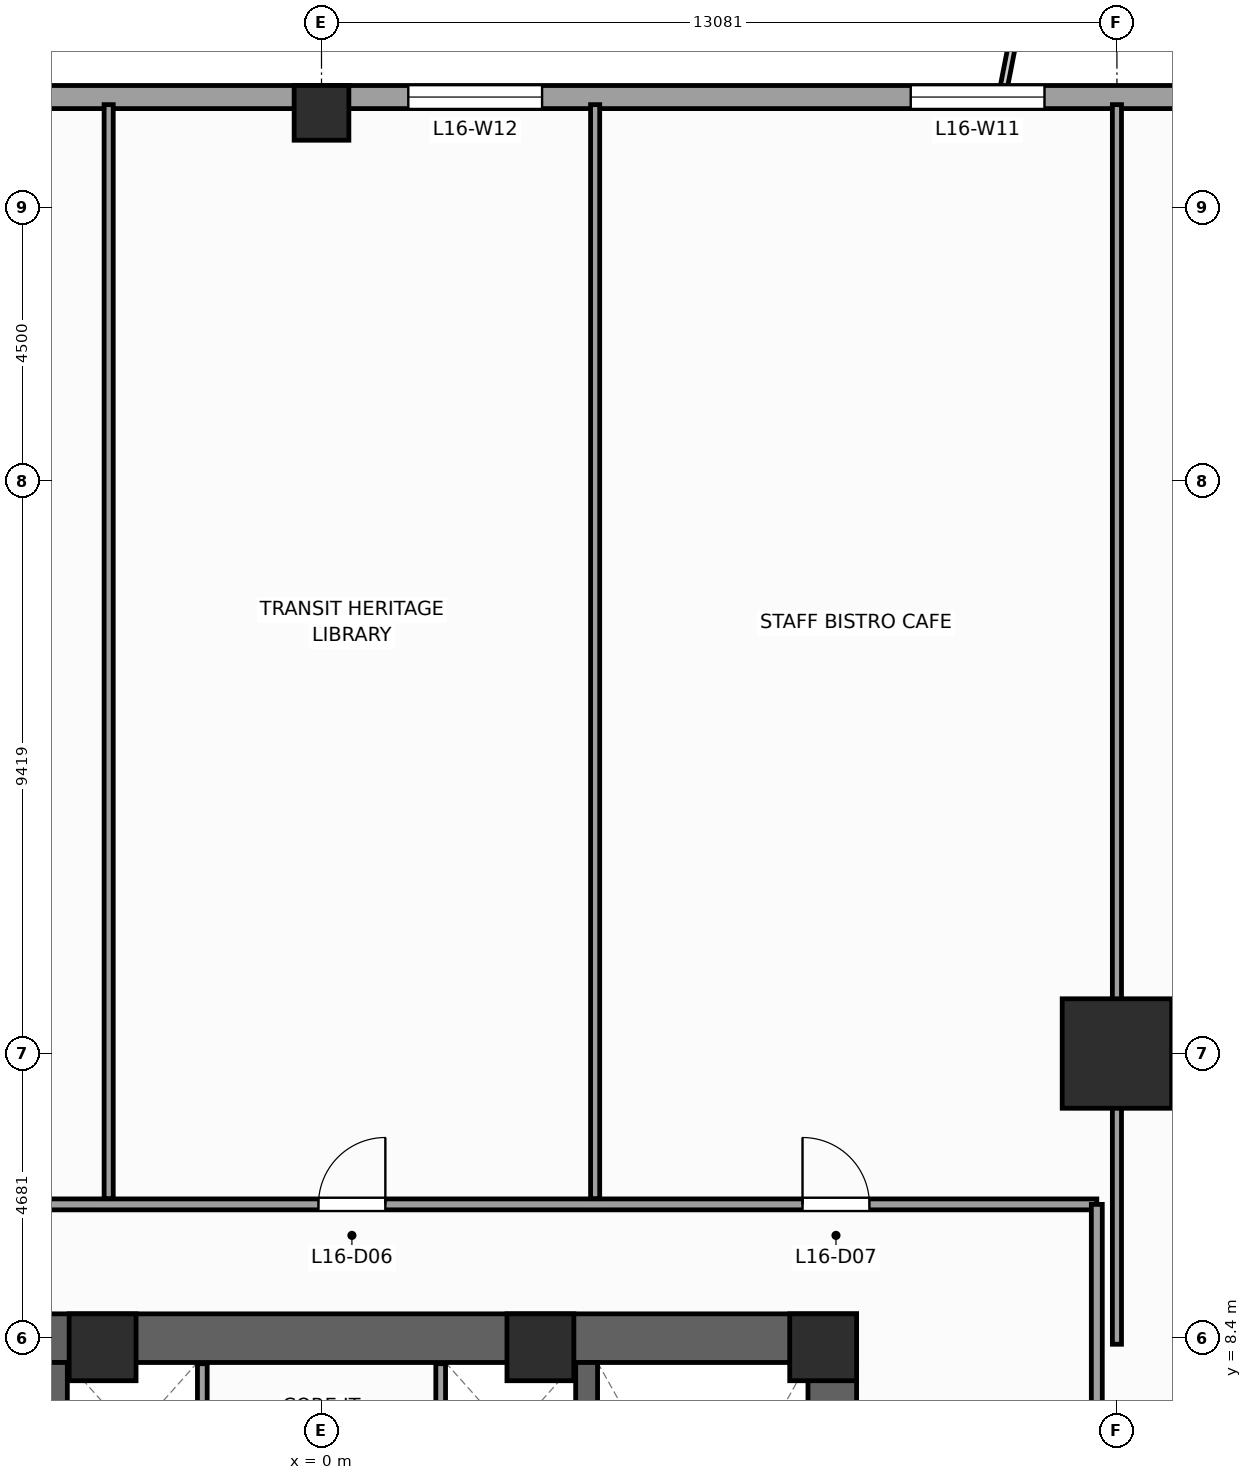
"""IFC4 building model, lengths in metres.
Left out: names, types, materials, properties, quantities, classifications, styles, units other than length and angle.
Written with IfcOpenShell. Run it as: python <this file> out.ifc"""

import sys

from ifc_helpers import new_model, si_unit, direction, frame, frame_2d, origin, origin_2d, place, context, subcontext, project, spatial, rectangle, extrude, source, transform, mapped, element, fill, save


model = new_model("IFC4")
c1 = context("Model", 3, precision=1e-05, world=origin(), true_north=direction((0.0, 1.0)))
c2 = subcontext(c1, "Body", "Model", "MODEL_VIEW")
j1 = project(units=[si_unit("LENGTHUNIT", "METRE"), si_unit("PLANEANGLEUNIT", "RADIAN")], contexts=[c1])
p1 = place(None, origin())
s1 = spatial("IfcSite", under=j1, at=p1, CompositionType="ELEMENT")
p2 = place(p1, origin())
s2 = spatial("IfcBuilding", under=s1, at=p2, CompositionType="ELEMENT")
p3 = place(p2, frame((0.0, 0.0, 70.0)))
s3 = spatial("IfcBuildingStorey", under=s2, at=p3, CompositionType="ELEMENT", Elevation=70.0)
p4 = place(p3, frame((-8.8, 8.4, 0.0), z_axis=(0.0, 0.0, 1.0), x_axis=(1.0, 0.0, 0.0)))
e1 = element("IfcWall", 1, at=p4, inside=s3, PredefinedType="SHEAR", context=c2, shape_type="SweptSolid", body=[
    extrude(rectangle(XDim=17.6, YDim=0.8, at=frame_2d((8.8, 0.0))), origin(), (0.0, 0.0, 1.0), 4.0),
])
p5 = place(p3, frame((8.4, -8.0, 0.0), z_axis=(0.0, 0.0, 1.0), x_axis=(0.0, 1.0, 0.0)))
e2 = element("IfcWall", 2, at=p5, inside=s3, PredefinedType="SHEAR", context=c2, shape_type="SweptSolid", body=[
    extrude(rectangle(XDim=16.0, YDim=0.8, at=frame_2d((8.0, 0.0))), origin(), (0.0, 0.0, 1.0), 4.0),
])
p6 = place(p5, frame((4.69, 0.0, 0.0)))
e3 = element("IfcOpeningElement", 3, at=p6, cuts=e2, PredefinedType="OPENING", context=c2, shape_type="SweptSolid", body=[
    extrude(rectangle(XDim=1.3, YDim=2.2, at=frame_2d((0.65, 1.1))), frame((0.0, 0.41, 0.0), z_axis=(0.0, -1.0, 0.0), x_axis=(1.0, 0.0, 0.0)), (0.0, 0.0, 1.0), 0.82),
])
for number, where, z_axis, x_axis in (
    (4, (-4.36, -8.0, 0.0), (0.0, 0.0, 1.0), (0.0, 1.0, 0.0)),
    (5, (4.36, -8.0, 0.0), (0.0, 0.0, 1.0), (0.0, 1.0, 0.0)),
):
    element("IfcWall", number, at=place(p3, frame(where, z_axis=z_axis, x_axis=x_axis)), inside=s3, PredefinedType="SHEAR", context=c2, shape_type="SweptSolid", body=[
        extrude(rectangle(XDim=16.0, YDim=0.36, at=frame_2d((8.0, 0.0))), origin(), (0.0, 0.0, 1.0), 4.0),
    ])
m1 = source(origin(), c2, "Body", "SweptSolid", [
    extrude(rectangle(XDim=1.1, YDim=1.1, at=origin_2d()), origin(), (0.0, 0.0, 1.0), 4.0),
])
for number, where, z_axis, x_axis in (
    (6, (8.25, 8.25, 0.0), (0.0, 0.0, 1.0), (1.0, 0.0, 0.0)),
    (7, (-3.6, 8.25, 0.0), (0.0, 0.0, 1.0), (1.0, 0.0, 0.0)),
    (8, (3.6, 8.25, 0.0), (0.0, 0.0, 1.0), (1.0, 0.0, 0.0)),
):
    element("IfcColumn", number, at=place(p3, frame(where, z_axis=z_axis, x_axis=x_axis)), inside=s3, PredefinedType="PILASTER", context=c2, shape_type="MappedRepresentation", body=[
        mapped(m1, transform((0.0, 0.0, 0.0), scale=1.0)),
    ])
m2 = source(origin(), c2, "Body", "SweptSolid", [
    extrude(rectangle(XDim=1.8, YDim=1.8, at=origin_2d()), origin(), (0.0, 0.0, 1.0), 4.0),
])
p7 = place(p3, frame((13.081, 13.081, 0.0), z_axis=(0.0, 0.0, 1.0), x_axis=(1.0, 0.0, 0.0)))
e9 = element("IfcColumn", 9, at=p7, inside=s3, PredefinedType="COLUMN", context=c2, shape_type="MappedRepresentation", body=[
    mapped(m2, transform((0.0, 0.0, 0.0), scale=1.0)),
])
m3 = source(origin(), c2, "Body", "SweptSolid", [
    extrude(rectangle(XDim=0.9, YDim=0.9, at=origin_2d()), origin(), (0.0, 0.0, 1.0), 4.0),
])
p8 = place(p3, frame((0.0, 28.55, 0.0), z_axis=(0.0, 0.0, 1.0), x_axis=(1.0, 0.0, 0.0)))
e10 = element("IfcColumn", 10, at=p8, inside=s3, PredefinedType="COLUMN", context=c2, shape_type="MappedRepresentation", body=[
    mapped(m3, transform((0.0, 0.0, 0.0), scale=1.0)),
])
p9 = place(p3, frame((25.69, 28.81, 0.0), z_axis=(0.0, 0.0, 1.0), x_axis=(-1.0, 0.0, 0.0)))
e11 = element("IfcWall", 11, at=p9, inside=s3, PredefinedType="STANDARD", context=c2, shape_type="SweptSolid", body=[
    extrude(rectangle(XDim=51.38, YDim=0.38, at=frame_2d((25.69, 0.0))), origin(), (0.0, 0.0, 1.0), 3.12),
])
p10 = place(p9, frame((5.466, 0.0, 0.49)))
e12 = element("IfcOpeningElement", 12, at=p10, cuts=e11, PredefinedType="OPENING", context=c2, shape_type="SweptSolid", body=[
    extrude(rectangle(XDim=1.4, YDim=2.4, at=frame_2d((0.7, 1.2))), frame((0.0, 0.2, 0.0), z_axis=(0.0, -1.0, 0.0), x_axis=(1.0, 0.0, 0.0)), (0.0, 0.0, 1.0), 0.4),
])
p11 = place(p9, frame((13.8, 0.0, 0.49)))
e13 = element("IfcOpeningElement", 13, at=p11, cuts=e11, PredefinedType="OPENING", context=c2, shape_type="SweptSolid", body=[
    extrude(rectangle(XDim=2.2, YDim=2.4, at=frame_2d((1.1, 1.2))), frame((0.0, 0.2, 0.0), z_axis=(0.0, -1.0, 0.0), x_axis=(1.0, 0.0, 0.0)), (0.0, 0.0, 1.0), 0.4),
])
p12 = place(p9, frame((22.062, 0.0, 0.49)))
e14 = element("IfcOpeningElement", 14, at=p12, cuts=e11, PredefinedType="OPENING", context=c2, shape_type="SweptSolid", body=[
    extrude(rectangle(XDim=2.2, YDim=2.4, at=frame_2d((1.1, 1.2))), frame((0.0, 0.2, 0.0), z_axis=(0.0, -1.0, 0.0), x_axis=(1.0, 0.0, 0.0)), (0.0, 0.0, 1.0), 0.4),
])
p13 = place(p9, frame((33.838, 0.0, 0.49)))
e15 = element("IfcOpeningElement", 15, at=p13, cuts=e11, PredefinedType="OPENING", context=c2, shape_type="SweptSolid", body=[
    extrude(rectangle(XDim=2.2, YDim=2.4, at=frame_2d((1.1, 1.2))), frame((0.0, 0.2, 0.0), z_axis=(0.0, -1.0, 0.0), x_axis=(1.0, 0.0, 0.0)), (0.0, 0.0, 1.0), 0.4),
])
p14 = place(p9, frame((43.487, 0.0, 0.49)))
e16 = element("IfcOpeningElement", 16, at=p14, cuts=e11, PredefinedType="OPENING", context=c2, shape_type="SweptSolid", body=[
    extrude(rectangle(XDim=1.4, YDim=2.4, at=frame_2d((0.7, 1.2))), frame((0.0, 0.2, 0.0), z_axis=(0.0, -1.0, 0.0), x_axis=(1.0, 0.0, 0.0)), (0.0, 0.0, 1.0), 0.4),
])
for number, where, z_axis, x_axis in (
    (17, (-1.96, 4.58, 0.0), (0.0, 0.0, 1.0), (0.0, 1.0, 0.0)),
    (18, (1.96, 4.58, 0.0), (0.0, 0.0, 1.0), (0.0, 1.0, 0.0)),
):
    element("IfcWall", number, at=place(p3, frame(where, z_axis=z_axis, x_axis=x_axis)), inside=s3, PredefinedType="PARTITIONING", context=c2, shape_type="SweptSolid", body=[
        extrude(rectangle(XDim=3.4, YDim=0.16, at=frame_2d((1.7, 0.0))), origin(), (0.0, 0.0, 1.0), 3.72),
    ])
p15 = place(p3, frame((-11.7, 10.6, 0.0), z_axis=(0.0, 0.0, 1.0), x_axis=(1.0, 0.0, 0.0)))
e19 = element("IfcWall", 19, at=p15, inside=s3, PredefinedType="PARTITIONING", context=c2, shape_type="SweptSolid", body=[
    extrude(rectangle(XDim=24.45, YDim=0.18, at=frame_2d((12.225, 0.0))), origin(), (0.0, 0.0, 1.0), 3.72),
])
p16 = place(p15, frame((3.714, 0.0, 0.0)))
e20 = element("IfcOpeningElement", 20, at=p16, cuts=e19, PredefinedType="OPENING", context=c2, shape_type="SweptSolid", body=[
    extrude(rectangle(XDim=1.1, YDim=2.2, at=frame_2d((0.55, 1.1))), frame((0.0, 0.1, 0.0), z_axis=(0.0, -1.0, 0.0), x_axis=(1.0, 0.0, 0.0)), (0.0, 0.0, 1.0), 0.2),
])
p17 = place(p15, frame((11.65, 0.0, 0.0)))
e21 = element("IfcOpeningElement", 21, at=p17, cuts=e19, PredefinedType="OPENING", context=c2, shape_type="SweptSolid", body=[
    extrude(rectangle(XDim=1.1, YDim=2.2, at=frame_2d((0.55, 1.1))), frame((0.0, 0.1, 0.0), z_axis=(0.0, -1.0, 0.0), x_axis=(1.0, 0.0, 0.0)), (0.0, 0.0, 1.0), 0.2),
])
p18 = place(p15, frame((19.611, 0.0, 0.0)))
e22 = element("IfcOpeningElement", 22, at=p18, cuts=e19, PredefinedType="OPENING", context=c2, shape_type="SweptSolid", body=[
    extrude(rectangle(XDim=1.1, YDim=2.2, at=frame_2d((0.55, 1.1))), frame((0.0, 0.1, 0.0), z_axis=(0.0, -1.0, 0.0), x_axis=(1.0, 0.0, 0.0)), (0.0, 0.0, 1.0), 0.2),
])
p19 = place(p3, frame((12.75, -1.05, 0.0), z_axis=(0.0, 0.0, 1.0), x_axis=(0.0, 1.0, 0.0)))
e23 = element("IfcWall", 23, at=p19, inside=s3, PredefinedType="PARTITIONING", context=c2, shape_type="SweptSolid", body=[
    extrude(rectangle(XDim=11.65, YDim=0.18, at=frame_2d((5.825, 0.0))), origin(), (0.0, 0.0, 1.0), 3.72),
])
p20 = place(p19, frame((6.462, 0.0, 0.0)))
e24 = element("IfcOpeningElement", 24, at=p20, cuts=e23, PredefinedType="OPENING", context=c2, shape_type="SweptSolid", body=[
    extrude(rectangle(XDim=1.1, YDim=2.2, at=frame_2d((0.55, 1.1))), frame((0.0, 0.1, 0.0), z_axis=(0.0, -1.0, 0.0), x_axis=(1.0, 0.0, 0.0)), (0.0, 0.0, 1.0), 0.2),
])
for number, where, z_axis, x_axis in (
    (25, (-3.5, 10.695, 0.0), (0.0, 0.0, 1.0), (0.0, 1.0, 0.0)),
    (26, (4.5, 10.695, 0.0), (0.0, 0.0, 1.0), (0.0, 1.0, 0.0)),
):
    element("IfcWall", number, at=place(p3, frame(where, z_axis=z_axis, x_axis=x_axis)), inside=s3, PredefinedType="PARTITIONING", context=c2, shape_type="SweptSolid", body=[
        extrude(rectangle(XDim=17.99, YDim=0.15, at=frame_2d((8.995, 0.0))), origin(), (0.0, 0.0, 1.0), 3.72),
    ])
p21 = place(p3, frame((13.081, 8.3, 0.0), z_axis=(0.0, 0.0, 1.0), x_axis=(0.0, 1.0, 0.0)))
e27 = element("IfcWall", 27, at=p21, inside=s3, PredefinedType="PARTITIONING", context=c2, shape_type="SweptSolid", body=[
    extrude(rectangle(XDim=20.385, YDim=0.15, at=frame_2d((10.192, 0.0))), origin(), (0.0, 0.0, 1.0), 2.712),
])
m4 = source(origin(), c2, "Body", "SweptSolid", [
    extrude(rectangle(XDim=2.2, YDim=2.4, at=frame_2d((1.1, 1.2))), frame((0.0, 0.03, 0.0), z_axis=(0.0, -1.0, 0.0), x_axis=(1.0, 0.0, 0.0)), (0.0, 0.0, 1.0), 0.06),
])
p22 = place(p11, origin())
e28 = element("IfcWindow", 28, at=p22, inside=s3, PartitioningType="SINGLE_PANEL", PredefinedType="WINDOW", context=c2, shape_type="MappedRepresentation", body=[
    mapped(m4, transform((0.0, 0.0, 0.0), scale=1.0)),
])
fill(e13, e28)
p23 = place(p12, origin())
e29 = element("IfcWindow", 29, at=p23, inside=s3, PartitioningType="SINGLE_PANEL", PredefinedType="WINDOW", context=c2, shape_type="MappedRepresentation", body=[
    mapped(m4, transform((0.0, 0.0, 0.0), scale=1.0)),
])
fill(e14, e29)
m5 = source(origin(), c2, "Body", "SweptSolid", [
    extrude(rectangle(XDim=1.1, YDim=2.2, at=frame_2d((0.55, 1.1))), frame((0.0, 0.025, 0.0), z_axis=(0.0, -1.0, 0.0), x_axis=(1.0, 0.0, 0.0)), (0.0, 0.0, 1.0), 0.05),
])
p24 = place(p17, origin())
e30 = element("IfcDoor", 30, at=p24, inside=s3, OperationType="SINGLE_SWING_RIGHT", PredefinedType="DOOR", context=c2, shape_type="MappedRepresentation", body=[
    mapped(m5, transform((0.0, 0.0, 0.0), scale=1.0)),
])
fill(e21, e30)
p25 = place(p18, origin())
e31 = element("IfcDoor", 31, at=p25, inside=s3, OperationType="SINGLE_SWING_LEFT", PredefinedType="DOOR", context=c2, shape_type="MappedRepresentation", body=[
    mapped(m5, transform((0.0, 0.0, 0.0), scale=1.0)),
])
fill(e22, e31)
save(model, sys.argv[1])
